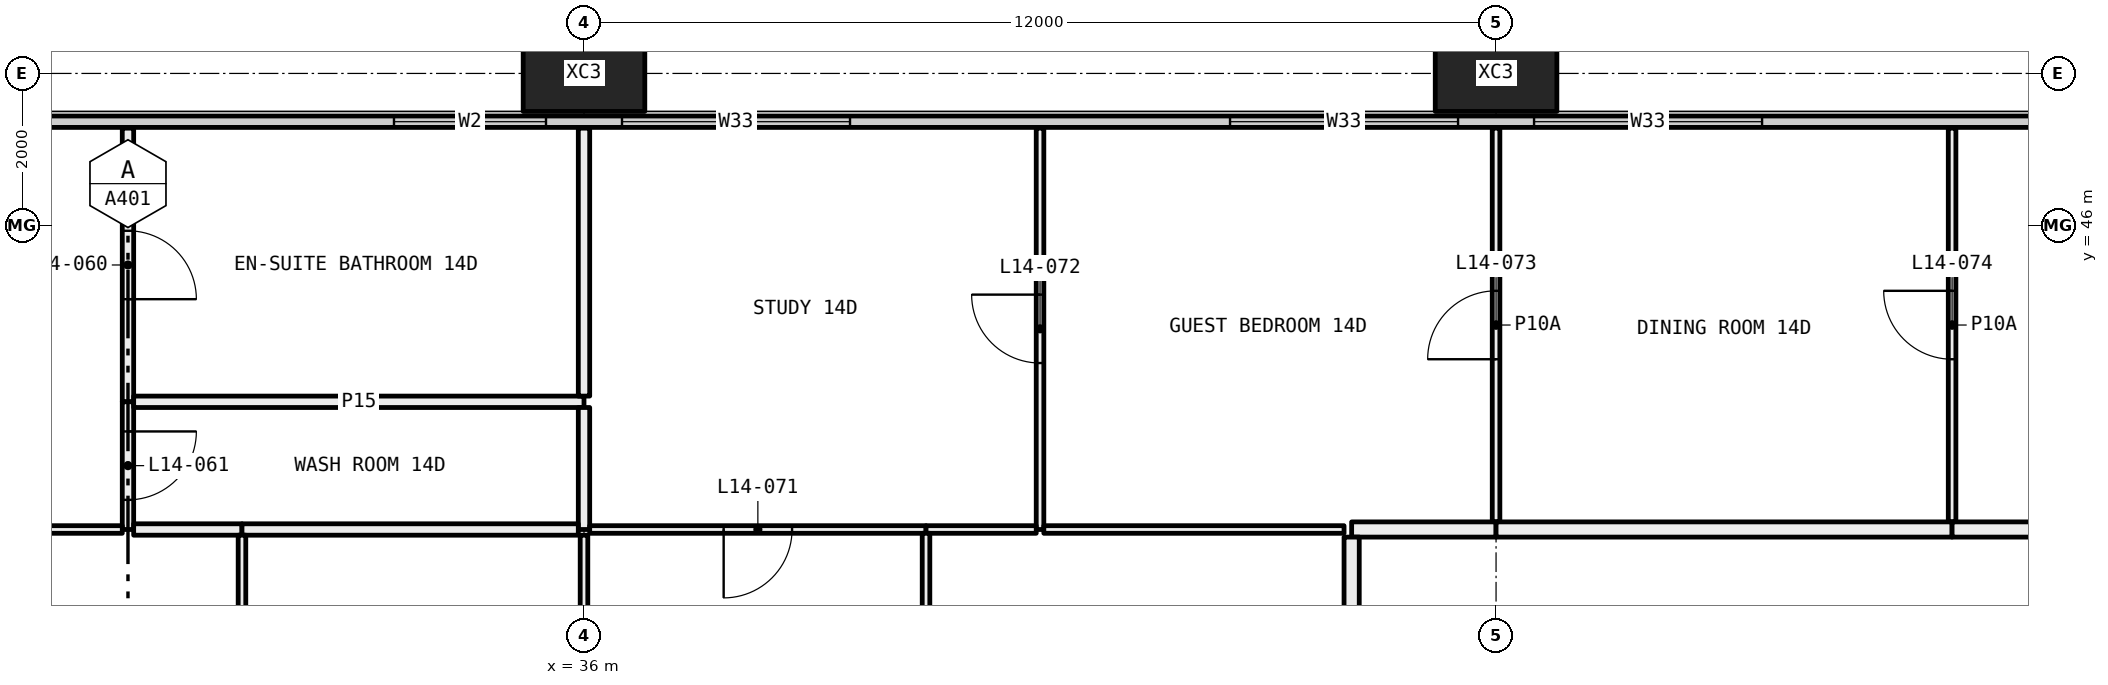
"""IFC4 building model, lengths in metres.
Left out: names, types, materials, properties, quantities, classifications, styles, units other than length and angle.
Written with IfcOpenShell. Run it as: python <this file> out.ifc"""

import sys

from ifc_helpers import new_model, si_unit, direction, frame, frame_2d, origin, origin_2d, place, context, subcontext, project, spatial, rectangle, hollow_rectangle, extrude, element, fill, save


model = new_model("IFC4")
c1 = context("Model", 3, precision=1e-05, world=origin(), true_north=direction((0.0, 1.0)))
c2 = subcontext(c1, "Body", "Model", "MODEL_VIEW")
j1 = project(units=[si_unit("LENGTHUNIT", "METRE"), si_unit("PLANEANGLEUNIT", "RADIAN")], contexts=[c1])
p1 = place(None, origin())
s1 = spatial("IfcSite", under=j1, at=p1, CompositionType="ELEMENT")
p2 = place(p1, origin())
s2 = spatial("IfcBuilding", under=s1, at=p2, CompositionType="ELEMENT")
p3 = place(p2, frame((0.0, 0.0, 61.05)))
s3 = spatial("IfcBuildingStorey", under=s2, at=p3, CompositionType="ELEMENT", Elevation=61.05)
for number, where, z_axis, x_axis in (
    (1, (36.0, 48.0, -0.4), (0.0, 0.0, 1.0), (1.0, 0.0, 0.0)),
    (2, (48.0, 48.0, -0.4), (0.0, 0.0, 1.0), (1.0, 0.0, 0.0)),
):
    element("IfcColumn", number, at=place(p3, frame(where, z_axis=z_axis, x_axis=x_axis)), inside=s3, PredefinedType="COLUMN", context=c2, shape_type="SweptSolid", body=[
        extrude(hollow_rectangle(XDim=1.6, YDim=1.0, WallThickness=0.065, at=origin_2d()), origin(), (0.0, 0.0, 1.0), 3.45),
    ])
p4 = place(p3, frame((6.56, 47.365, 0.0), z_axis=(0.0, 0.0, 1.0), x_axis=(1.0, 0.0, 0.0)))
e3 = element("IfcWall", 3, at=p4, inside=s3, PredefinedType="ELEMENTEDWALL", context=c2, shape_type="SweptSolid", body=[
    extrude(rectangle(XDim=58.88, YDim=0.15, at=frame_2d((29.44, 0.0))), origin(), (0.0, 0.0, 1.0), 3.05),
])
p5 = place(p4, frame((0.44, 0.0, 0.45)))
e4 = element("IfcOpeningElement", 4, at=p5, cuts=e3, PredefinedType="OPENING", context=c2, shape_type="SweptSolid", body=[
    extrude(rectangle(XDim=4.5, YDim=2.55, at=frame_2d((2.25, 1.275))), frame((0.0, 0.085, 0.0), z_axis=(0.0, -1.0, 0.0), x_axis=(1.0, 0.0, 0.0)), (0.0, 0.0, 1.0), 0.17),
])
p6 = place(p4, frame((5.94, 0.0, 0.45)))
e5 = element("IfcOpeningElement", 5, at=p6, cuts=e3, PredefinedType="OPENING", context=c2, shape_type="SweptSolid", body=[
    extrude(rectangle(XDim=3.0, YDim=2.55, at=frame_2d((1.5, 1.275))), frame((0.0, 0.085, 0.0), z_axis=(0.0, -1.0, 0.0), x_axis=(1.0, 0.0, 0.0)), (0.0, 0.0, 1.0), 0.17),
])
p7 = place(p4, frame((13.94, 0.0, 0.45)))
e6 = element("IfcOpeningElement", 6, at=p7, cuts=e3, PredefinedType="OPENING", context=c2, shape_type="SweptSolid", body=[
    extrude(rectangle(XDim=3.0, YDim=2.55, at=frame_2d((1.5, 1.275))), frame((0.0, 0.085, 0.0), z_axis=(0.0, -1.0, 0.0), x_axis=(1.0, 0.0, 0.0)), (0.0, 0.0, 1.0), 0.17),
])
p8 = place(p4, frame((17.94, 0.0, 0.45)))
e7 = element("IfcOpeningElement", 7, at=p8, cuts=e3, PredefinedType="OPENING", context=c2, shape_type="SweptSolid", body=[
    extrude(rectangle(XDim=3.0, YDim=2.55, at=frame_2d((1.5, 1.275))), frame((0.0, 0.085, 0.0), z_axis=(0.0, -1.0, 0.0), x_axis=(1.0, 0.0, 0.0)), (0.0, 0.0, 1.0), 0.17),
])
p9 = place(p4, frame((26.94, 0.0, 0.45)))
e8 = element("IfcOpeningElement", 8, at=p9, cuts=e3, PredefinedType="OPENING", context=c2, shape_type="SweptSolid", body=[
    extrude(rectangle(XDim=2.0, YDim=2.55, at=frame_2d((1.0, 1.275))), frame((0.0, 0.085, 0.0), z_axis=(0.0, -1.0, 0.0), x_axis=(1.0, 0.0, 0.0)), (0.0, 0.0, 1.0), 0.17),
])
p10 = place(p4, frame((29.94, 0.0, 0.45)))
e9 = element("IfcOpeningElement", 9, at=p10, cuts=e3, PredefinedType="OPENING", context=c2, shape_type="SweptSolid", body=[
    extrude(rectangle(XDim=3.0, YDim=2.55, at=frame_2d((1.5, 1.275))), frame((0.0, 0.085, 0.0), z_axis=(0.0, -1.0, 0.0), x_axis=(1.0, 0.0, 0.0)), (0.0, 0.0, 1.0), 0.17),
])
p11 = place(p4, frame((37.94, 0.0, 0.45)))
e10 = element("IfcOpeningElement", 10, at=p11, cuts=e3, PredefinedType="OPENING", context=c2, shape_type="SweptSolid", body=[
    extrude(rectangle(XDim=3.0, YDim=2.55, at=frame_2d((1.5, 1.275))), frame((0.0, 0.085, 0.0), z_axis=(0.0, -1.0, 0.0), x_axis=(1.0, 0.0, 0.0)), (0.0, 0.0, 1.0), 0.17),
])
p12 = place(p4, frame((41.94, 0.0, 0.45)))
e11 = element("IfcOpeningElement", 11, at=p12, cuts=e3, PredefinedType="OPENING", context=c2, shape_type="SweptSolid", body=[
    extrude(rectangle(XDim=3.0, YDim=2.55, at=frame_2d((1.5, 1.275))), frame((0.0, 0.085, 0.0), z_axis=(0.0, -1.0, 0.0), x_axis=(1.0, 0.0, 0.0)), (0.0, 0.0, 1.0), 0.17),
])
p13 = place(p4, frame((50.94, 0.0, 0.45)))
e12 = element("IfcOpeningElement", 12, at=p13, cuts=e3, PredefinedType="OPENING", context=c2, shape_type="SweptSolid", body=[
    extrude(rectangle(XDim=2.0, YDim=2.55, at=frame_2d((1.0, 1.275))), frame((0.0, 0.085, 0.0), z_axis=(0.0, -1.0, 0.0), x_axis=(1.0, 0.0, 0.0)), (0.0, 0.0, 1.0), 0.17),
])
p14 = place(p4, frame((53.94, 0.0, 0.45)))
e13 = element("IfcOpeningElement", 13, at=p14, cuts=e3, PredefinedType="OPENING", context=c2, shape_type="SweptSolid", body=[
    extrude(rectangle(XDim=4.5, YDim=2.55, at=frame_2d((2.25, 1.275))), frame((0.0, 0.085, 0.0), z_axis=(0.0, -1.0, 0.0), x_axis=(1.0, 0.0, 0.0)), (0.0, 0.0, 1.0), 0.17),
])
p15 = place(p3, frame((30.0, 43.68, 0.0), z_axis=(0.0, 0.0, 1.0), x_axis=(0.0, 1.0, 0.0)))
e14 = element("IfcWall", 14, at=p15, inside=s3, PredefinedType="PARTITIONING", context=c2, shape_type="SweptSolid", body=[
    extrude(rectangle(XDim=3.6, YDim=0.15, at=frame_2d((1.8, 0.0))), origin(), (0.0, 0.0, 1.0), 3.05),
])
p16 = place(p15, frame((1.35, 0.0, 0.0)))
e15 = element("IfcOpeningElement", 15, at=p16, cuts=e14, PredefinedType="OPENING", context=c2, shape_type="SweptSolid", body=[
    extrude(rectangle(XDim=0.9, YDim=2.1, at=frame_2d((0.45, 1.05))), frame((0.0, 0.085, 0.0), z_axis=(0.0, -1.0, 0.0), x_axis=(1.0, 0.0, 0.0)), (0.0, 0.0, 1.0), 0.17),
])
p17 = place(p3, frame((30.0, 42.0, 0.0), z_axis=(0.0, 0.0, 1.0), x_axis=(0.0, 1.0, 0.0)))
e16 = element("IfcWall", 16, at=p17, inside=s3, PredefinedType="PARTITIONING", context=c2, shape_type="SweptSolid", body=[
    extrude(rectangle(XDim=1.68, YDim=0.15, at=frame_2d((0.84, 0.0))), origin(), (0.0, 0.0, 1.0), 3.05),
])
p18 = place(p17, frame((0.39, 0.0, 0.0)))
e17 = element("IfcOpeningElement", 17, at=p18, cuts=e16, PredefinedType="OPENING", context=c2, shape_type="SweptSolid", body=[
    extrude(rectangle(XDim=0.9, YDim=2.1, at=frame_2d((0.45, 1.05))), frame((0.0, 0.085, 0.0), z_axis=(0.0, -1.0, 0.0), x_axis=(1.0, 0.0, 0.0)), (0.0, 0.0, 1.0), 0.17),
])
p19 = place(p3, frame((26.0, 42.0, 0.0), z_axis=(0.0, 0.0, 1.0), x_axis=(1.0, 0.0, 0.0)))
e18 = element("IfcWall", 18, at=p19, inside=s3, PredefinedType="PARTITIONING", context=c2, shape_type="SweptSolid", body=[
    extrude(rectangle(XDim=3.925, YDim=0.1, at=frame_2d((1.962, 0.0))), origin(), (0.0, 0.0, 1.0), 3.05),
])
p20 = place(p19, frame((1.512, 0.0, 0.0)))
e19 = element("IfcOpeningElement", 19, at=p20, cuts=e18, PredefinedType="OPENING", context=c2, shape_type="SweptSolid", body=[
    extrude(rectangle(XDim=0.9, YDim=2.1, at=frame_2d((0.45, 1.05))), frame((0.0, 0.06, 0.0), z_axis=(0.0, -1.0, 0.0), x_axis=(1.0, 0.0, 0.0)), (0.0, 0.0, 1.0), 0.12),
])
p21 = place(p3, frame((30.075, 43.68, 0.0), z_axis=(0.0, 0.0, 1.0), x_axis=(1.0, 0.0, 0.0)))
e20 = element("IfcWall", 20, at=p21, inside=s3, PredefinedType="PARTITIONING", context=c2, shape_type="SweptSolid", body=[
    extrude(rectangle(XDim=5.925, YDim=0.15, at=frame_2d((2.962, 0.0))), origin(), (0.0, 0.0, 1.0), 2.45),
])
p22 = place(p3, frame((36.0, 43.755, 0.0), z_axis=(0.0, 0.0, 1.0), x_axis=(0.0, 1.0, 0.0)))
e21 = element("IfcWall", 21, at=p22, inside=s3, PredefinedType="PARTITIONING", context=c2, shape_type="SweptSolid", body=[
    extrude(rectangle(XDim=3.525, YDim=0.15, at=frame_2d((1.763, 0.0))), origin(), (0.0, 0.0, 1.0), 2.45),
])
p23 = place(p3, frame((36.0, 42.0, 0.0), z_axis=(0.0, 0.0, 1.0), x_axis=(0.0, 1.0, 0.0)))
e22 = element("IfcWall", 22, at=p23, inside=s3, PredefinedType="PARTITIONING", context=c2, shape_type="SweptSolid", body=[
    extrude(rectangle(XDim=1.605, YDim=0.15, at=frame_2d((0.802, 0.0))), origin(), (0.0, 0.0, 1.0), 2.45),
])
p24 = place(p3, frame((30.075, 42.0, 0.0), z_axis=(0.0, 0.0, 1.0), x_axis=(1.0, 0.0, 0.0)))
e23 = element("IfcWall", 23, at=p24, inside=s3, PredefinedType="PARTITIONING", context=c2, shape_type="SweptSolid", body=[
    extrude(rectangle(XDim=1.425, YDim=0.15, at=frame_2d((0.712, 0.0))), origin(), (0.0, 0.0, 1.0), 3.05),
])
p25 = place(p3, frame((31.5, 42.0, 0.0), z_axis=(0.0, 0.0, 1.0), x_axis=(1.0, 0.0, 0.0)))
e24 = element("IfcWall", 24, at=p25, inside=s3, PredefinedType="PARTITIONING", context=c2, shape_type="SweptSolid", body=[
    extrude(rectangle(XDim=4.425, YDim=0.15, at=frame_2d((2.212, 0.0))), origin(), (0.0, 0.0, 1.0), 2.45),
])
p26 = place(p3, frame((42.0, 42.0, 0.0), z_axis=(0.0, 0.0, 1.0), x_axis=(0.0, 1.0, 0.0)))
e25 = element("IfcWall", 25, at=p26, inside=s3, PredefinedType="PARTITIONING", context=c2, shape_type="SweptSolid", body=[
    extrude(rectangle(XDim=5.28, YDim=0.1, at=frame_2d((2.64, 0.0))), origin(), (0.0, 0.0, 1.0), 3.05),
])
p27 = place(p26, frame((2.19, 0.0, 0.0)))
e26 = element("IfcOpeningElement", 26, at=p27, cuts=e25, PredefinedType="OPENING", context=c2, shape_type="SweptSolid", body=[
    extrude(rectangle(XDim=0.9, YDim=2.1, at=frame_2d((0.45, 1.05))), frame((0.0, 0.06, 0.0), z_axis=(0.0, -1.0, 0.0), x_axis=(1.0, 0.0, 0.0)), (0.0, 0.0, 1.0), 0.12),
])
p28 = place(p3, frame((36.075, 42.0, 0.0), z_axis=(0.0, 0.0, 1.0), x_axis=(1.0, 0.0, 0.0)))
e27 = element("IfcWall", 27, at=p28, inside=s3, PredefinedType="PARTITIONING", context=c2, shape_type="SweptSolid", body=[
    extrude(rectangle(XDim=4.425, YDim=0.1, at=frame_2d((2.212, 0.0))), origin(), (0.0, 0.0, 1.0), 2.45),
])
p29 = place(p28, frame((1.762, 0.0, 0.0)))
e28 = element("IfcOpeningElement", 28, at=p29, cuts=e27, PredefinedType="OPENING", context=c2, shape_type="SweptSolid", body=[
    extrude(rectangle(XDim=0.9, YDim=2.1, at=frame_2d((0.45, 1.05))), frame((0.0, 0.06, 0.0), z_axis=(0.0, -1.0, 0.0), x_axis=(1.0, 0.0, 0.0)), (0.0, 0.0, 1.0), 0.12),
])
p30 = place(p3, frame((40.5, 42.0, 0.0), z_axis=(0.0, 0.0, 1.0), x_axis=(1.0, 0.0, 0.0)))
e29 = element("IfcWall", 29, at=p30, inside=s3, PredefinedType="PARTITIONING", context=c2, shape_type="SweptSolid", body=[
    extrude(rectangle(XDim=1.45, YDim=0.1, at=frame_2d((0.725, 0.0))), origin(), (0.0, 0.0, 1.0), 3.05),
])
p31 = place(p3, frame((48.0, 42.1, 0.0), z_axis=(0.0, 0.0, 1.0), x_axis=(0.0, 1.0, 0.0)))
e30 = element("IfcWall", 30, at=p31, inside=s3, PredefinedType="PARTITIONING", context=c2, shape_type="SweptSolid", body=[
    extrude(rectangle(XDim=5.18, YDim=0.1, at=frame_2d((2.59, 0.0))), origin(), (0.0, 0.0, 1.0), 3.05),
])
p32 = place(p31, frame((2.14, 0.0, 0.0)))
e31 = element("IfcOpeningElement", 31, at=p32, cuts=e30, PredefinedType="OPENING", context=c2, shape_type="SweptSolid", body=[
    extrude(rectangle(XDim=0.9, YDim=2.1, at=frame_2d((0.45, 1.05))), frame((0.0, 0.06, 0.0), z_axis=(0.0, -1.0, 0.0), x_axis=(1.0, 0.0, 0.0)), (0.0, 0.0, 1.0), 0.12),
])
p33 = place(p3, frame((42.05, 42.0, 0.0), z_axis=(0.0, 0.0, 1.0), x_axis=(1.0, 0.0, 0.0)))
e32 = element("IfcWall", 32, at=p33, inside=s3, PredefinedType="PARTITIONING", context=c2, shape_type="SweptSolid", body=[
    extrude(rectangle(XDim=3.95, YDim=0.1, at=frame_2d((1.975, 0.0))), origin(), (0.0, 0.0, 1.0), 3.05),
])
p34 = place(p3, frame((46.1, 42.0, 0.0), z_axis=(0.0, 0.0, 1.0), x_axis=(1.0, 0.0, 0.0)))
e33 = element("IfcWall", 33, at=p34, inside=s3, PredefinedType="PARTITIONING", context=c2, shape_type="SweptSolid", body=[
    extrude(rectangle(XDim=1.9, YDim=0.2, at=frame_2d((0.95, 0.0))), origin(), (0.0, 0.0, 1.0), 3.05),
])
p35 = place(p3, frame((54.0, 42.1, 0.0), z_axis=(0.0, 0.0, 1.0), x_axis=(0.0, 1.0, 0.0)))
e34 = element("IfcWall", 34, at=p35, inside=s3, PredefinedType="PARTITIONING", context=c2, shape_type="SweptSolid", body=[
    extrude(rectangle(XDim=5.18, YDim=0.1, at=frame_2d((2.59, 0.0))), origin(), (0.0, 0.0, 1.0), 3.05),
])
p36 = place(p35, frame((2.14, 0.0, 0.0)))
e35 = element("IfcOpeningElement", 35, at=p36, cuts=e34, PredefinedType="OPENING", context=c2, shape_type="SweptSolid", body=[
    extrude(rectangle(XDim=0.9, YDim=2.1, at=frame_2d((0.45, 1.05))), frame((0.0, 0.06, 0.0), z_axis=(0.0, -1.0, 0.0), x_axis=(1.0, 0.0, 0.0)), (0.0, 0.0, 1.0), 0.12),
])
p37 = place(p3, frame((48.0, 42.0, 0.0), z_axis=(0.0, 0.0, 1.0), x_axis=(1.0, 0.0, 0.0)))
e36 = element("IfcWall", 36, at=p37, inside=s3, PredefinedType="PARTITIONING", context=c2, shape_type="SweptSolid", body=[
    extrude(rectangle(XDim=6.0, YDim=0.2, at=frame_2d((3.0, 0.0))), origin(), (0.0, 0.0, 1.0), 3.05),
])
p38 = place(p3, frame((54.0, 42.0, 0.0), z_axis=(0.0, 0.0, 1.0), x_axis=(1.0, 0.0, 0.0)))
e37 = element("IfcWall", 37, at=p38, inside=s3, PredefinedType="PARTITIONING", context=c2, shape_type="SweptSolid", body=[
    extrude(rectangle(XDim=7.9, YDim=0.2, at=frame_2d((3.95, 0.0))), origin(), (0.0, 0.0, 1.0), 3.05),
])
p39 = place(p3, frame((31.5, 36.1, 0.0), z_axis=(0.0, 0.0, 1.0), x_axis=(0.0, 1.0, 0.0)))
e38 = element("IfcWall", 38, at=p39, inside=s3, PredefinedType="PARTITIONING", context=c2, shape_type="SweptSolid", body=[
    extrude(rectangle(XDim=5.825, YDim=0.1, at=frame_2d((2.913, 0.0))), origin(), (0.0, 0.0, 1.0), 3.05),
])
p40 = place(p39, frame((2.462, 0.0, 0.0)))
e39 = element("IfcOpeningElement", 39, at=p40, cuts=e38, PredefinedType="OPENING", context=c2, shape_type="SweptSolid", body=[
    extrude(rectangle(XDim=0.9, YDim=2.1, at=frame_2d((0.45, 1.05))), frame((0.0, 0.06, 0.0), z_axis=(0.0, -1.0, 0.0), x_axis=(1.0, 0.0, 0.0)), (0.0, 0.0, 1.0), 0.12),
])
p41 = place(p3, frame((36.0, 36.8, 0.0), z_axis=(0.0, 0.0, 1.0), x_axis=(0.0, 1.0, 0.0)))
e40 = element("IfcWall", 40, at=p41, inside=s3, PredefinedType="PARTITIONING", context=c2, shape_type="SweptSolid", body=[
    extrude(rectangle(XDim=5.125, YDim=0.1, at=frame_2d((2.562, 0.0))), origin(), (0.0, 0.0, 1.0), 2.45),
])
p42 = place(p41, frame((2.113, 0.0, 0.0)))
e41 = element("IfcOpeningElement", 41, at=p42, cuts=e40, PredefinedType="OPENING", context=c2, shape_type="SweptSolid", body=[
    extrude(rectangle(XDim=0.9, YDim=2.1, at=frame_2d((0.45, 1.05))), frame((0.0, 0.06, 0.0), z_axis=(0.0, -1.0, 0.0), x_axis=(1.0, 0.0, 0.0)), (0.0, 0.0, 1.0), 0.12),
])
p43 = place(p3, frame((40.5, 36.1, 0.0), z_axis=(0.0, 0.0, 1.0), x_axis=(0.0, 1.0, 0.0)))
e42 = element("IfcWall", 42, at=p43, inside=s3, PredefinedType="PARTITIONING", context=c2, shape_type="SweptSolid", body=[
    extrude(rectangle(XDim=5.85, YDim=0.1, at=frame_2d((2.925, 0.0))), origin(), (0.0, 0.0, 1.0), 3.05),
])
p44 = place(p43, frame((2.475, 0.0, 0.0)))
e43 = element("IfcOpeningElement", 43, at=p44, cuts=e42, PredefinedType="OPENING", context=c2, shape_type="SweptSolid", body=[
    extrude(rectangle(XDim=0.9, YDim=2.1, at=frame_2d((0.45, 1.05))), frame((0.0, 0.06, 0.0), z_axis=(0.0, -1.0, 0.0), x_axis=(1.0, 0.0, 0.0)), (0.0, 0.0, 1.0), 0.12),
])
p45 = place(p3, frame((46.1, 36.1, 0.0), z_axis=(0.0, 0.0, 1.0), x_axis=(0.0, 1.0, 0.0)))
e44 = element("IfcWall", 44, at=p45, inside=s3, PredefinedType="PARTITIONING", context=c2, shape_type="SweptSolid", body=[
    extrude(rectangle(XDim=5.8, YDim=0.2, at=frame_2d((2.9, 0.0))), origin(), (0.0, 0.0, 1.0), 3.05),
])
p46 = place(p9, origin())
e45 = element("IfcWindow", 45, at=p46, inside=s3, PartitioningType="SINGLE_PANEL", PredefinedType="WINDOW", context=c2, shape_type="SweptSolid", body=[
    extrude(rectangle(XDim=2.0, YDim=2.55, at=frame_2d((1.0, 1.275))), frame((0.0, 0.03, 0.0), z_axis=(0.0, -1.0, 0.0), x_axis=(1.0, 0.0, 0.0)), (0.0, 0.0, 1.0), 0.06),
])
fill(e8, e45)
p47 = place(p10, origin())
e46 = element("IfcWindow", 46, at=p47, inside=s3, PartitioningType="SINGLE_PANEL", PredefinedType="WINDOW", context=c2, shape_type="SweptSolid", body=[
    extrude(rectangle(XDim=3.0, YDim=2.55, at=frame_2d((1.5, 1.275))), frame((0.0, 0.03, 0.0), z_axis=(0.0, -1.0, 0.0), x_axis=(1.0, 0.0, 0.0)), (0.0, 0.0, 1.0), 0.06),
])
fill(e9, e46)
p48 = place(p11, origin())
e47 = element("IfcWindow", 47, at=p48, inside=s3, PartitioningType="SINGLE_PANEL", PredefinedType="WINDOW", context=c2, shape_type="SweptSolid", body=[
    extrude(rectangle(XDim=3.0, YDim=2.55, at=frame_2d((1.5, 1.275))), frame((0.0, 0.03, 0.0), z_axis=(0.0, -1.0, 0.0), x_axis=(1.0, 0.0, 0.0)), (0.0, 0.0, 1.0), 0.06),
])
fill(e10, e47)
p49 = place(p12, origin())
e48 = element("IfcWindow", 48, at=p49, inside=s3, PartitioningType="SINGLE_PANEL", PredefinedType="WINDOW", context=c2, shape_type="SweptSolid", body=[
    extrude(rectangle(XDim=3.0, YDim=2.55, at=frame_2d((1.5, 1.275))), frame((0.0, 0.03, 0.0), z_axis=(0.0, -1.0, 0.0), x_axis=(1.0, 0.0, 0.0)), (0.0, 0.0, 1.0), 0.06),
])
fill(e11, e48)
p50 = place(p16, frame((0.9, 0.0, 0.0), x_axis=(-1.0, 0.0, 0.0)))
e49 = element("IfcDoor", 49, at=p50, inside=s3, OperationType="SINGLE_SWING_LEFT", PredefinedType="DOOR", context=c2, shape_type="SweptSolid", body=[
    extrude(rectangle(XDim=0.9, YDim=2.1, at=frame_2d((0.45, 1.05))), frame((0.0, 0.025, 0.0), z_axis=(0.0, -1.0, 0.0), x_axis=(1.0, 0.0, 0.0)), (0.0, 0.0, 1.0), 0.05),
])
fill(e15, e49)
p51 = place(p18, frame((0.9, 0.0, 0.0), x_axis=(-1.0, 0.0, 0.0)))
e50 = element("IfcDoor", 50, at=p51, inside=s3, OperationType="SINGLE_SWING_RIGHT", PredefinedType="DOOR", context=c2, shape_type="SweptSolid", body=[
    extrude(rectangle(XDim=0.9, YDim=2.1, at=frame_2d((0.45, 1.05))), frame((0.0, 0.025, 0.0), z_axis=(0.0, -1.0, 0.0), x_axis=(1.0, 0.0, 0.0)), (0.0, 0.0, 1.0), 0.05),
])
fill(e17, e50)
p52 = place(p29, frame((0.9, 0.0, 0.0), x_axis=(-1.0, 0.0, 0.0)))
e51 = element("IfcDoor", 51, at=p52, inside=s3, OperationType="SINGLE_SWING_LEFT", PredefinedType="DOOR", context=c2, shape_type="SweptSolid", body=[
    extrude(rectangle(XDim=0.9, YDim=2.1, at=frame_2d((0.45, 1.05))), frame((0.0, 0.025, 0.0), z_axis=(0.0, -1.0, 0.0), x_axis=(1.0, 0.0, 0.0)), (0.0, 0.0, 1.0), 0.05),
])
fill(e28, e51)
p53 = place(p27, origin())
e52 = element("IfcDoor", 52, at=p53, inside=s3, OperationType="SINGLE_SWING_LEFT", PredefinedType="DOOR", context=c2, shape_type="SweptSolid", body=[
    extrude(rectangle(XDim=0.9, YDim=2.1, at=frame_2d((0.45, 1.05))), frame((0.0, 0.025, 0.0), z_axis=(0.0, -1.0, 0.0), x_axis=(1.0, 0.0, 0.0)), (0.0, 0.0, 1.0), 0.05),
])
fill(e26, e52)
p54 = place(p32, origin())
e53 = element("IfcDoor", 53, at=p54, inside=s3, OperationType="SINGLE_SWING_RIGHT", PredefinedType="DOOR", context=c2, shape_type="SweptSolid", body=[
    extrude(rectangle(XDim=0.9, YDim=2.1, at=frame_2d((0.45, 1.05))), frame((0.0, 0.025, 0.0), z_axis=(0.0, -1.0, 0.0), x_axis=(1.0, 0.0, 0.0)), (0.0, 0.0, 1.0), 0.05),
])
fill(e31, e53)
p55 = place(p36, origin())
e54 = element("IfcDoor", 54, at=p55, inside=s3, OperationType="SINGLE_SWING_LEFT", PredefinedType="DOOR", context=c2, shape_type="SweptSolid", body=[
    extrude(rectangle(XDim=0.9, YDim=2.1, at=frame_2d((0.45, 1.05))), frame((0.0, 0.025, 0.0), z_axis=(0.0, -1.0, 0.0), x_axis=(1.0, 0.0, 0.0)), (0.0, 0.0, 1.0), 0.05),
])
fill(e35, e54)
save(model, sys.argv[1])
